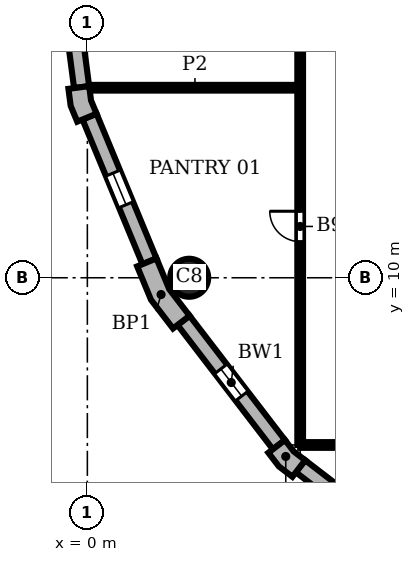
"""IFC4 building model, lengths in metres.
Left out: names, types, materials, properties, quantities, classifications, styles, units other than length and angle.
Written with IfcOpenShell. Run it as: python <this file> out.ifc"""

import sys

from ifc_helpers import new_model, si_unit, direction, frame, frame_2d, origin, origin_2d, place, context, subcontext, project, spatial, polyline, rectangle, circle, outline, extrude, element, fill, save


model = new_model("IFC4")
c1 = context("Model", 3, precision=1e-05, world=origin(), true_north=direction((0.0, 1.0)))
c2 = subcontext(c1, "Body", "Model", "MODEL_VIEW")
j1 = project(units=[si_unit("LENGTHUNIT", "METRE"), si_unit("PLANEANGLEUNIT", "RADIAN")], contexts=[c1])
p1 = place(None, origin())
s1 = spatial("IfcSite", under=j1, at=p1, CompositionType="ELEMENT")
p2 = place(p1, origin())
s2 = spatial("IfcBuilding", under=s1, at=p2, CompositionType="ELEMENT")
p3 = place(p2, frame((0.0, 0.0, 225.3)))
s3 = spatial("IfcBuildingStorey", under=s2, at=p3, CompositionType="ELEMENT", Elevation=225.3)
p4 = place(p3, frame((2.679, 10.0, 0.0), z_axis=(0.0, 0.0, 1.0), x_axis=(1.0, 0.0, 0.0)))
e1 = element("IfcColumn", 1, at=p4, inside=s3, PredefinedType="COLUMN", context=c2, shape_type="SweptSolid", body=[
    extrude(circle(Radius=0.5, at=origin_2d()), origin(), (0.0, 0.0, 1.0), 3.9),
])
p5 = place(p3, origin())
e2 = element("IfcWall", 2, at=p5, inside=s3, PredefinedType="SOLIDWALL", context=c2, shape_type="SweptSolid", body=[
    extrude(outline(polyline([(-0.349, 14.99), (-0.498, 14.971), (-0.439, 14.523), (-0.266, 14.106), (-0.128, 14.164), (0.242, 14.317), (0.097, 14.667), (0.047, 15.043), (-0.349, 14.99)])), origin(), (0.0, 0.0, 1.0), 3.9),
])
e3 = element("IfcWall", 3, at=p5, inside=s3, PredefinedType="SOLIDWALL", context=c2, shape_type="SweptSolid", body=[
    extrude(outline(polyline([(1.449, 10.356), (1.311, 10.299), (1.675, 9.42), (2.254, 8.665), (2.373, 8.757), (2.69, 9.0), (2.155, 9.698), (1.819, 10.51), (1.449, 10.356)])), origin(), (0.0, 0.0, 1.0), 3.9),
])
e4 = element("IfcWall", 4, at=p5, inside=s3, PredefinedType="SOLIDWALL", context=c2, shape_type="SweptSolid", body=[
    extrude(outline(polyline([(4.882, 5.487), (4.763, 5.396), (5.038, 5.038), (5.396, 4.763), (5.487, 4.882), (5.731, 5.199), (5.43, 5.43), (5.199, 5.731), (4.882, 5.487)])), origin(), (0.0, 0.0, 1.0), 3.9),
])
p6 = place(p3, frame((-0.689, 19.102, 0.0), z_axis=(0.0, 0.0, 1.0), x_axis=(0.130514280502, -0.991446429508, 0.0)))
e5 = element("IfcWall", 5, at=p6, inside=s3, PredefinedType="SOLIDWALL", context=c2, shape_type="SweptSolid", body=[
    extrude(rectangle(XDim=4.121, YDim=0.4, at=frame_2d((2.061, 0.0))), origin(), (0.0, 0.0, 1.0), 3.9),
])
p7 = place(p6, frame((1.611, 0.0, 0.9)))
e6 = element("IfcOpeningElement", 6, at=p7, cuts=e5, PredefinedType="OPENING", context=c2, shape_type="SweptSolid", body=[
    extrude(rectangle(XDim=0.9, YDim=2.35, at=frame_2d((0.45, 1.175))), frame((0.0, 0.21, 0.0), z_axis=(0.0, -1.0, 0.0), x_axis=(1.0, 0.0, 0.0)), (0.0, 0.0, 1.0), 0.42),
])
p8 = place(p3, frame((0.057, 14.24, 0.0), z_axis=(0.0, 0.0, 1.0), x_axis=(0.382721546029, -0.923863744394, 0.0)))
e7 = element("IfcWall", 7, at=p8, inside=s3, PredefinedType="SOLIDWALL", context=c2, shape_type="SweptSolid", body=[
    extrude(rectangle(XDim=4.121, YDim=0.4, at=frame_2d((2.061, 0.0))), origin(), (0.0, 0.0, 1.0), 3.9),
])
p9 = place(p8, frame((1.611, 0.0, 0.9)))
e8 = element("IfcOpeningElement", 8, at=p9, cuts=e7, PredefinedType="OPENING", context=c2, shape_type="SweptSolid", body=[
    extrude(rectangle(XDim=0.9, YDim=2.35, at=frame_2d((0.45, 1.175))), frame((0.0, 0.21, 0.0), z_axis=(0.0, -1.0, 0.0), x_axis=(1.0, 0.0, 0.0)), (0.0, 0.0, 1.0), 0.42),
])
p10 = place(p3, frame((2.532, 8.878, 0.0), z_axis=(0.0, 0.0, 1.0), x_axis=(0.608759824817, -0.793354571229, 0.0)))
e9 = element("IfcWall", 9, at=p10, inside=s3, PredefinedType="SOLIDWALL", context=c2, shape_type="SweptSolid", body=[
    extrude(rectangle(XDim=4.121, YDim=0.4, at=frame_2d((2.061, 0.0))), origin(), (0.0, 0.0, 1.0), 3.9),
])
p11 = place(p10, frame((1.611, 0.0, 0.9)))
e10 = element("IfcOpeningElement", 10, at=p11, cuts=e9, PredefinedType="OPENING", context=c2, shape_type="SweptSolid", body=[
    extrude(rectangle(XDim=0.9, YDim=2.35, at=frame_2d((0.45, 1.175))), frame((0.0, 0.21, 0.0), z_axis=(0.0, -1.0, 0.0), x_axis=(1.0, 0.0, 0.0)), (0.0, 0.0, 1.0), 0.42),
])
p12 = place(p3, frame((5.609, 5.041, 0.0), z_axis=(0.0, 0.0, 1.0), x_axis=(0.793354571229, -0.608759824817, 0.0)))
e11 = element("IfcWall", 11, at=p12, inside=s3, PredefinedType="SOLIDWALL", context=c2, shape_type="SweptSolid", body=[
    extrude(rectangle(XDim=4.121, YDim=0.4, at=frame_2d((2.061, 0.0))), origin(), (0.0, 0.0, 1.0), 3.9),
])
p13 = place(p12, frame((1.611, 0.0, 0.9)))
e12 = element("IfcOpeningElement", 12, at=p13, cuts=e11, PredefinedType="OPENING", context=c2, shape_type="SweptSolid", body=[
    extrude(rectangle(XDim=0.9, YDim=2.35, at=frame_2d((0.45, 1.175))), frame((0.0, 0.21, 0.0), z_axis=(0.0, -1.0, 0.0), x_axis=(1.0, 0.0, 0.0)), (0.0, 0.0, 1.0), 0.42),
])
p14 = place(p3, frame((5.6, 5.6, 0.0), z_axis=(0.0, 0.0, 1.0), x_axis=(0.0, 1.0, 0.0)))
e13 = element("IfcWall", 13, at=p14, inside=s3, PredefinedType="PARTITIONING", context=c2, shape_type="SweptSolid", body=[
    extrude(rectangle(XDim=22.4, YDim=0.15, at=frame_2d((11.2, 0.0))), origin(), (0.0, 0.0, 1.0), 3.58),
])
p15 = place(p14, frame((5.35, 0.0, 0.0)))
e14 = element("IfcOpeningElement", 14, at=p15, cuts=e13, PredefinedType="OPENING", context=c2, shape_type="SweptSolid", body=[
    extrude(rectangle(XDim=0.8, YDim=2.1, at=frame_2d((0.4, 1.05))), frame((0.0, 0.085, 0.0), z_axis=(0.0, -1.0, 0.0), x_axis=(1.0, 0.0, 0.0)), (0.0, 0.0, 1.0), 0.17),
])
p16 = place(p14, frame((11.5, 0.0, 0.0)))
e15 = element("IfcOpeningElement", 15, at=p16, cuts=e13, PredefinedType="OPENING", context=c2, shape_type="SweptSolid", body=[
    extrude(rectangle(XDim=0.8, YDim=2.1, at=frame_2d((0.4, 1.05))), frame((0.0, 0.085, 0.0), z_axis=(0.0, -1.0, 0.0), x_axis=(1.0, 0.0, 0.0)), (0.0, 0.0, 1.0), 0.17),
])
p17 = place(p14, frame((17.75, 0.0, 0.0)))
e16 = element("IfcOpeningElement", 16, at=p17, cuts=e13, PredefinedType="OPENING", context=c2, shape_type="SweptSolid", body=[
    extrude(rectangle(XDim=1.8, YDim=2.1, at=frame_2d((0.9, 1.05))), frame((0.0, 0.085, 0.0), z_axis=(0.0, -1.0, 0.0), x_axis=(1.0, 0.0, 0.0)), (0.0, 0.0, 1.0), 0.17),
])
p18 = place(p3, frame((5.6, 5.6, 0.0), z_axis=(0.0, 0.0, 1.0), x_axis=(1.0, 0.0, 0.0)))
e17 = element("IfcWall", 17, at=p18, inside=s3, PredefinedType="PARTITIONING", context=c2, shape_type="SweptSolid", body=[
    extrude(rectangle(XDim=25.4, YDim=0.15, at=frame_2d((12.7, 0.0))), origin(), (0.0, 0.0, 1.0), 3.58),
])
p19 = place(p18, frame((20.75, 0.0, 0.0)))
e18 = element("IfcOpeningElement", 18, at=p19, cuts=e17, PredefinedType="OPENING", context=c2, shape_type="SweptSolid", body=[
    extrude(rectangle(XDim=1.0, YDim=2.1, at=frame_2d((0.5, 1.05))), frame((0.0, 0.085, 0.0), z_axis=(0.0, -1.0, 0.0), x_axis=(1.0, 0.0, 0.0)), (0.0, 0.0, 1.0), 0.17),
])
p20 = place(p18, frame((5.35, 0.0, 0.0)))
e19 = element("IfcOpeningElement", 19, at=p20, cuts=e17, PredefinedType="OPENING", context=c2, shape_type="SweptSolid", body=[
    extrude(rectangle(XDim=0.8, YDim=2.1, at=frame_2d((0.4, 1.05))), frame((0.0, 0.085, 0.0), z_axis=(0.0, -1.0, 0.0), x_axis=(1.0, 0.0, 0.0)), (0.0, 0.0, 1.0), 0.17),
])
p21 = place(p18, frame((11.5, 0.0, 0.0)))
e20 = element("IfcOpeningElement", 20, at=p21, cuts=e17, PredefinedType="OPENING", context=c2, shape_type="SweptSolid", body=[
    extrude(rectangle(XDim=0.8, YDim=2.1, at=frame_2d((0.4, 1.05))), frame((0.0, 0.085, 0.0), z_axis=(0.0, -1.0, 0.0), x_axis=(1.0, 0.0, 0.0)), (0.0, 0.0, 1.0), 0.17),
])
p22 = place(p3, frame((0.063, 15.0, 0.0), z_axis=(0.0, 0.0, 1.0), x_axis=(1.0, 0.0, 0.0)))
e21 = element("IfcWall", 21, at=p22, inside=s3, PredefinedType="PARTITIONING", context=c2, shape_type="SweptSolid", body=[
    extrude(rectangle(XDim=5.537, YDim=0.15, at=frame_2d((2.769, 0.0))), origin(), (0.0, 0.0, 1.0), 3.58),
])
p23 = place(p9, origin())
e22 = element("IfcWindow", 22, at=p23, inside=s3, PartitioningType="SINGLE_PANEL", PredefinedType="WINDOW", context=c2, shape_type="SweptSolid", body=[
    extrude(rectangle(XDim=0.9, YDim=2.35, at=frame_2d((0.45, 1.175))), frame((0.0, 0.16, 0.0), z_axis=(0.0, -1.0, 0.0), x_axis=(1.0, 0.0, 0.0)), (0.0, 0.0, 1.0), 0.06),
])
fill(e8, e22)
p24 = place(p11, origin())
e23 = element("IfcWindow", 23, at=p24, inside=s3, PartitioningType="SINGLE_PANEL", PredefinedType="WINDOW", context=c2, shape_type="SweptSolid", body=[
    extrude(rectangle(XDim=0.9, YDim=2.35, at=frame_2d((0.45, 1.175))), frame((0.0, 0.16, 0.0), z_axis=(0.0, -1.0, 0.0), x_axis=(1.0, 0.0, 0.0)), (0.0, 0.0, 1.0), 0.06),
])
fill(e10, e23)
p25 = place(p15, origin())
e24 = element("IfcDoor", 24, at=p25, inside=s3, OperationType="SINGLE_SWING_RIGHT", PredefinedType="DOOR", context=c2, shape_type="SweptSolid", body=[
    extrude(rectangle(XDim=0.8, YDim=2.1, at=frame_2d((0.4, 1.05))), frame((0.0, 0.025, 0.0), z_axis=(0.0, -1.0, 0.0), x_axis=(1.0, 0.0, 0.0)), (0.0, 0.0, 1.0), 0.05),
])
fill(e14, e24)
save(model, sys.argv[1])
